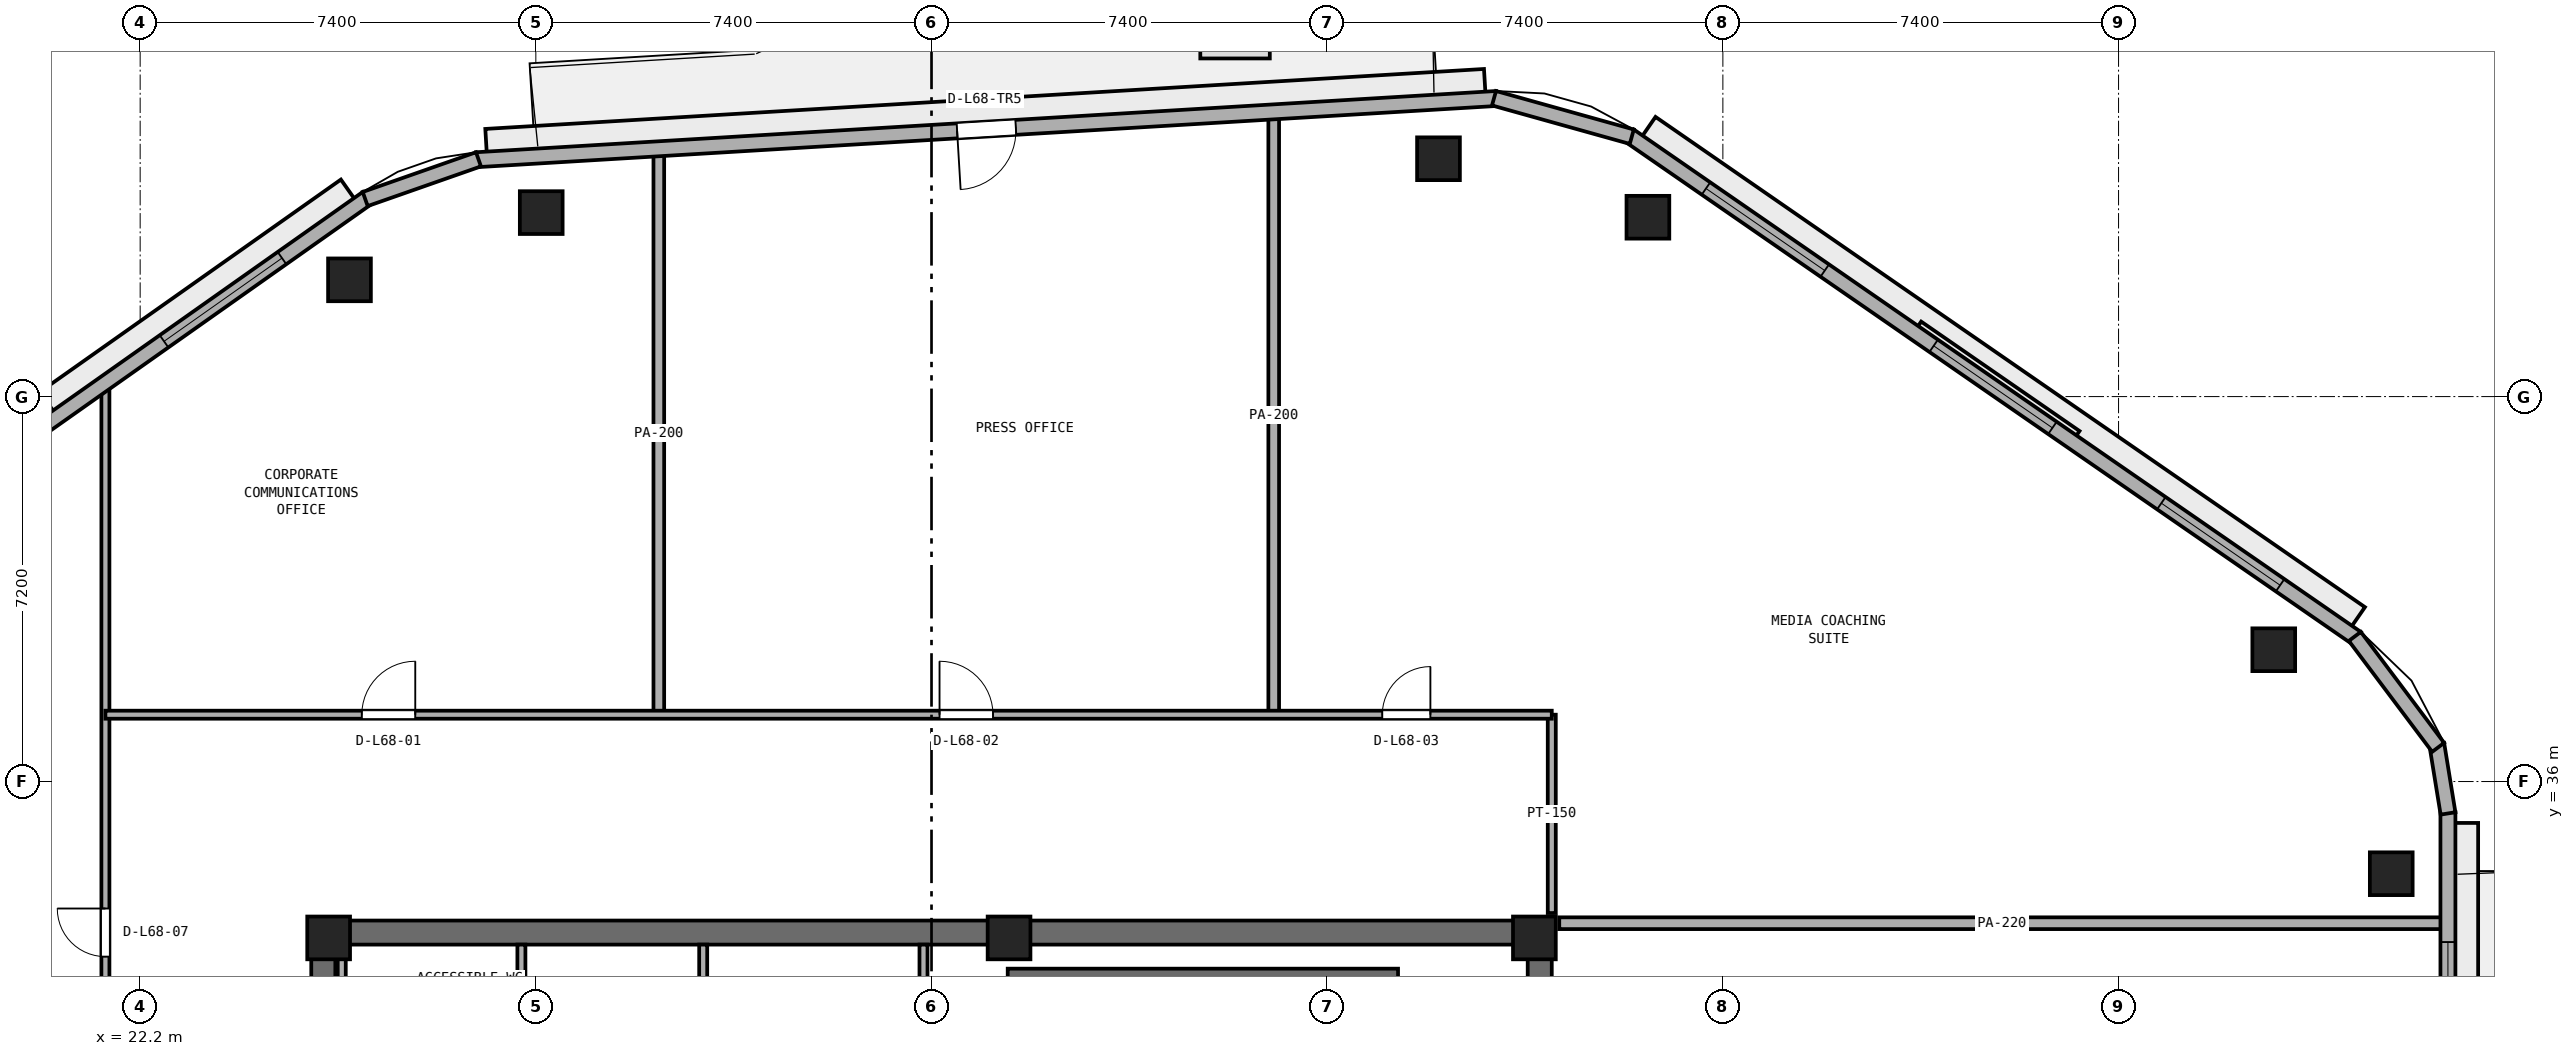
"""IFC4 building model, lengths in metres.
Left out: names, types, materials, properties, quantities, classifications, styles, units other than length and angle.
Written with IfcOpenShell. Run it as: python <this file> out.ifc"""

import sys

from ifc_helpers import new_model, si_unit, direction, frame, frame_2d, origin, origin_2d, place, context, subcontext, project, spatial, rectangle, extrude, element, fill, save


model = new_model("IFC4")
c1 = context("Model", 3, precision=1e-05, world=origin(), true_north=direction((0.0, 1.0)))
c2 = subcontext(c1, "Body", "Model", "MODEL_VIEW")
j1 = project(units=[si_unit("LENGTHUNIT", "METRE"), si_unit("PLANEANGLEUNIT", "RADIAN")], contexts=[c1])
p1 = place(None, origin())
s1 = spatial("IfcSite", under=j1, at=p1, CompositionType="ELEMENT")
p2 = place(p1, origin())
s2 = spatial("IfcBuilding", under=s1, at=p2, CompositionType="ELEMENT")
p3 = place(p2, frame((0.0, 0.0, 266.8)))
s3 = spatial("IfcBuildingStorey", under=s2, at=p3, CompositionType="ELEMENT", Elevation=266.8)
p4 = place(p3, frame((25.4, 33.175, 0.0), z_axis=(0.0, 0.0, 1.0), x_axis=(1.0, 0.0, 0.0)))
e1 = element("IfcWall", 1, at=p4, inside=s3, PredefinedType="SHEAR", context=c2, shape_type="SweptSolid", body=[
    extrude(rectangle(XDim=23.2, YDim=0.45, at=frame_2d((11.6, 0.0))), origin(), (0.0, 0.0, 1.0), 3.51),
])
p5 = place(p3, frame((25.625, 17.45, 0.0), z_axis=(0.0, 0.0, 1.0), x_axis=(0.0, 1.0, 0.0)))
e2 = element("IfcWall", 2, at=p5, inside=s3, PredefinedType="SHEAR", context=c2, shape_type="SweptSolid", body=[
    extrude(rectangle(XDim=15.5, YDim=0.45, at=frame_2d((7.75, 0.0))), origin(), (0.0, 0.0, 1.0), 3.51),
])
p6 = place(p5, frame((7.0, 0.0, 0.0)))
e3 = element("IfcOpeningElement", 3, at=p6, cuts=e2, PredefinedType="OPENING", context=c2, shape_type="SweptSolid", body=[
    extrude(rectangle(XDim=1.5, YDim=2.15, at=frame_2d((0.75, 1.075))), frame((0.0, 0.235, 0.0), z_axis=(0.0, -1.0, 0.0), x_axis=(1.0, 0.0, 0.0)), (0.0, 0.0, 1.0), 0.47),
])
p7 = place(p3, frame((48.375, 17.45, 0.0), z_axis=(0.0, 0.0, 1.0), x_axis=(0.0, 1.0, 0.0)))
e4 = element("IfcWall", 4, at=p7, inside=s3, PredefinedType="SHEAR", context=c2, shape_type="SweptSolid", body=[
    extrude(rectangle(XDim=15.5, YDim=0.45, at=frame_2d((7.75, 0.0))), origin(), (0.0, 0.0, 1.0), 3.51),
])
p8 = place(p7, frame((5.85, 0.0, 0.0)))
e5 = element("IfcOpeningElement", 5, at=p8, cuts=e4, PredefinedType="OPENING", context=c2, shape_type="SweptSolid", body=[
    extrude(rectangle(XDim=1.5, YDim=2.15, at=frame_2d((0.75, 1.075))), frame((0.0, 0.235, 0.0), z_axis=(0.0, -1.0, 0.0), x_axis=(1.0, 0.0, 0.0)), (0.0, 0.0, 1.0), 0.47),
])
for number, where, z_axis, x_axis in (
    (6, (48.275, 33.075, 0.0), (0.0, 0.0, 1.0), (1.0, 0.0, 0.0)),
    (7, (38.45, 33.075, 0.0), (0.0, 0.0, 1.0), (1.0, 0.0, 0.0)),
    (8, (25.725, 33.075, 0.0), (0.0, 0.0, 1.0), (1.0, 0.0, 0.0)),
):
    element("IfcColumn", number, at=place(p3, frame(where, z_axis=z_axis, x_axis=x_axis)), inside=s3, PredefinedType="PILASTER", context=c2, shape_type="SweptSolid", body=[
        extrude(rectangle(XDim=0.8, YDim=0.8, at=origin_2d()), origin(), (0.0, 0.0, 1.0), 3.8),
    ])
for number, where, z_axis, x_axis in (
    (9, (64.3, 34.276, 0.0), (0.0, 0.0, 1.0), (1.0, 0.0, 0.0)),
    (10, (62.103, 38.465, 0.0), (0.0, 0.0, 1.0), (1.0, 0.0, 0.0)),
    (11, (50.398, 46.554, 0.0), (0.0, 0.0, 1.0), (1.0, 0.0, 0.0)),
    (12, (46.481, 47.648, 0.0), (0.0, 0.0, 1.0), (1.0, 0.0, 0.0)),
    (13, (29.701, 46.641, 0.0), (0.0, 0.0, 1.0), (1.0, 0.0, 0.0)),
    (14, (26.115, 45.384, 0.0), (0.0, 0.0, 1.0), (1.0, 0.0, 0.0)),
):
    element("IfcColumn", number, at=place(p3, frame(where, z_axis=z_axis, x_axis=x_axis)), inside=s3, PredefinedType="COLUMN", context=c2, shape_type="SweptSolid", body=[
        extrude(rectangle(XDim=0.8, YDim=0.8, at=origin_2d()), origin(), (0.0, 0.0, 1.0), 3.8),
    ])
p9 = place(p3, frame((38.425, 32.375, 0.0), z_axis=(0.0, 0.0, 1.0), x_axis=(1.0, 0.0, 0.0)))
e15 = element("IfcWall", 15, at=p9, inside=s3, PredefinedType="SHEAR", context=c2, shape_type="SweptSolid", body=[
    extrude(rectangle(XDim=7.3, YDim=0.25, at=frame_2d((3.65, 0.0))), origin(), (0.0, 0.0, 1.0), 3.51),
])
p10 = place(p3, frame((25.97, 30.65, 0.0), z_axis=(0.0, 0.0, 1.0), x_axis=(0.0, 1.0, 0.0)))
e16 = element("IfcWall", 16, at=p10, inside=s3, PredefinedType="PARTITIONING", context=c2, shape_type="SweptSolid", body=[
    extrude(rectangle(XDim=2.3, YDim=0.15, at=frame_2d((1.15, 0.0))), origin(), (0.0, 0.0, 1.0), 2.61),
])
for number, where, z_axis, x_axis in (
    (17, (29.33, 30.65, 0.0), (0.0, 0.0, 1.0), (0.0, 1.0, 0.0)),
    (18, (32.73, 30.65, 0.0), (0.0, 0.0, 1.0), (0.0, 1.0, 0.0)),
    (19, (36.85, 30.65, 0.0), (0.0, 0.0, 1.0), (0.0, 1.0, 0.0)),
):
    element("IfcWall", number, at=place(p3, frame(where, z_axis=z_axis, x_axis=x_axis)), inside=s3, PredefinedType="PARTITIONING", context=c2, shape_type="SweptSolid", body=[
        extrude(rectangle(XDim=2.3, YDim=0.15, at=frame_2d((1.15, 0.0))), origin(), (0.0, 0.0, 1.0), 3.51),
    ])
p11 = place(p3, frame((48.6, 33.54, 0.0), z_axis=(0.0, 0.0, 1.0), x_axis=(0.0, 1.0, 0.0)))
e20 = element("IfcWall", 20, at=p11, inside=s3, PredefinedType="PARTITIONING", context=c2, shape_type="SweptSolid", body=[
    extrude(rectangle(XDim=3.71, YDim=0.15, at=frame_2d((1.855, 0.0))), origin(), (0.0, 0.0, 1.0), 2.893),
])
p12 = place(p3, frame((43.4, 37.25, 0.0), z_axis=(0.0, 0.0, 1.0), x_axis=(0.0, 1.0, 0.0)))
e21 = element("IfcWall", 21, at=p12, inside=s3, PredefinedType="PARTITIONING", context=c2, shape_type="SweptSolid", body=[
    extrude(rectangle(XDim=11.211, YDim=0.2, at=frame_2d((5.605, 0.0))), origin(), (0.0, 0.0, 1.0), 3.51),
])
p13 = place(p3, frame((31.9, 37.25, 0.0), z_axis=(0.0, 0.0, 1.0), x_axis=(0.0, 1.0, 0.0)))
e22 = element("IfcWall", 22, at=p13, inside=s3, PredefinedType="PARTITIONING", context=c2, shape_type="SweptSolid", body=[
    extrude(rectangle(XDim=10.52, YDim=0.2, at=frame_2d((5.26, 0.0))), origin(), (0.0, 0.0, 1.0), 3.51),
])
p14 = place(p3, frame((21.55, 6.608, 0.0), z_axis=(0.0, 0.0, 1.0), x_axis=(0.0, 1.0, 0.0)))
e23 = element("IfcWall", 23, at=p14, inside=s3, PredefinedType="PARTITIONING", context=c2, shape_type="SweptSolid", body=[
    extrude(rectangle(XDim=36.883, YDim=0.15, at=frame_2d((18.441, 0.0))), origin(), (0.0, 0.0, 1.0), 3.51),
])
p15 = place(p14, frame((14.067, 0.0, 0.0)))
e24 = element("IfcOpeningElement", 24, at=p15, cuts=e23, PredefinedType="OPENING", context=c2, shape_type="SweptSolid", body=[
    extrude(rectangle(XDim=0.9, YDim=2.1, at=frame_2d((0.45, 1.05))), frame((0.0, 0.085, 0.0), z_axis=(0.0, -1.0, 0.0), x_axis=(1.0, 0.0, 0.0)), (0.0, 0.0, 1.0), 0.17),
])
p16 = place(p14, frame((26.117, 0.0, 0.0)))
e25 = element("IfcOpeningElement", 25, at=p16, cuts=e23, PredefinedType="OPENING", context=c2, shape_type="SweptSolid", body=[
    extrude(rectangle(XDim=0.9, YDim=2.1, at=frame_2d((0.45, 1.05))), frame((0.0, 0.085, 0.0), z_axis=(0.0, -1.0, 0.0), x_axis=(1.0, 0.0, 0.0)), (0.0, 0.0, 1.0), 0.17),
])
p17 = place(p3, frame((48.74, 33.35, 0.0), z_axis=(0.0, 0.0, 1.0), x_axis=(1.0, 0.0, 0.0)))
e26 = element("IfcWall", 26, at=p17, inside=s3, PredefinedType="PARTITIONING", context=c2, shape_type="SweptSolid", body=[
    extrude(rectangle(XDim=16.555, YDim=0.22, at=frame_2d((8.277, 0.0))), origin(), (0.0, 0.0, 1.0), 2.893),
])
p18 = place(p3, frame((21.55, 37.25, 0.0), z_axis=(0.0, 0.0, 1.0), x_axis=(1.0, 0.0, 0.0)))
e27 = element("IfcWall", 27, at=p18, inside=s3, PredefinedType="PARTITIONING", context=c2, shape_type="SweptSolid", body=[
    extrude(rectangle(XDim=27.05, YDim=0.15, at=frame_2d((13.525, 0.0))), origin(), (0.0, 0.0, 1.0), 3.51),
])
p19 = place(p18, frame((4.795, 0.0, 0.0)))
e28 = element("IfcOpeningElement", 28, at=p19, cuts=e27, PredefinedType="OPENING", context=c2, shape_type="SweptSolid", body=[
    extrude(rectangle(XDim=1.0, YDim=2.12, at=frame_2d((0.5, 1.06))), frame((0.0, 0.085, 0.0), z_axis=(0.0, -1.0, 0.0), x_axis=(1.0, 0.0, 0.0)), (0.0, 0.0, 1.0), 0.17),
])
p20 = place(p18, frame((15.6, 0.0, 0.0)))
e29 = element("IfcOpeningElement", 29, at=p20, cuts=e27, PredefinedType="OPENING", context=c2, shape_type="SweptSolid", body=[
    extrude(rectangle(XDim=1.0, YDim=2.12, at=frame_2d((0.5, 1.06))), frame((0.0, 0.085, 0.0), z_axis=(0.0, -1.0, 0.0), x_axis=(1.0, 0.0, 0.0)), (0.0, 0.0, 1.0), 0.17),
])
p21 = place(p18, frame((23.88, 0.0, 0.0)))
e30 = element("IfcOpeningElement", 30, at=p21, cuts=e27, PredefinedType="OPENING", context=c2, shape_type="SweptSolid", body=[
    extrude(rectangle(XDim=0.9, YDim=2.1, at=frame_2d((0.45, 1.05))), frame((0.0, 0.085, 0.0), z_axis=(0.0, -1.0, 0.0), x_axis=(1.0, 0.0, 0.0)), (0.0, 0.0, 1.0), 0.17),
])
p22 = place(p3, frame((65.36, 16.258, 0.0), z_axis=(0.0, 0.0, 1.0), x_axis=(0.0, 1.0, 0.0)))
e31 = element("IfcWall", 31, at=p22, inside=s3, PredefinedType="STANDARD", context=c2, shape_type="SweptSolid", body=[
    extrude(rectangle(XDim=19.168, YDim=0.28, at=frame_2d((9.584, 0.0))), origin(), (0.0, 0.0, 1.0), 3.51),
])
p23 = place(p22, frame((9.034, 0.0, 0.0)))
e32 = element("IfcOpeningElement", 32, at=p23, cuts=e31, PredefinedType="OPENING", context=c2, shape_type="SweptSolid", body=[
    extrude(rectangle(XDim=1.1, YDim=2.2, at=frame_2d((0.55, 1.1))), frame((0.0, 0.15, 0.0), z_axis=(0.0, -1.0, 0.0), x_axis=(1.0, 0.0, 0.0)), (0.0, 0.0, 1.0), 0.3),
])
p24 = place(p22, frame((2.178, 0.0, 0.9)))
e33 = element("IfcOpeningElement", 33, at=p24, cuts=e31, PredefinedType="OPENING", context=c2, shape_type="SweptSolid", body=[
    extrude(rectangle(XDim=2.7, YDim=1.75, at=frame_2d((1.35, 0.875))), frame((0.0, 0.15, 0.0), z_axis=(0.0, -1.0, 0.0), x_axis=(1.0, 0.0, 0.0)), (0.0, 0.0, 1.0), 0.3),
])
p25 = place(p22, frame((14.04, 0.0, 0.9)))
e34 = element("IfcOpeningElement", 34, at=p25, cuts=e31, PredefinedType="OPENING", context=c2, shape_type="SweptSolid", body=[
    extrude(rectangle(XDim=2.7, YDim=1.75, at=frame_2d((1.35, 0.875))), frame((0.0, 0.15, 0.0), z_axis=(0.0, -1.0, 0.0), x_axis=(1.0, 0.0, 0.0)), (0.0, 0.0, 1.0), 0.3),
])
p26 = place(p3, frame((63.651, 38.683, 0.0), z_axis=(0.0, 0.0, 1.0), x_axis=(-0.822655095, 0.568540759022, 0.0)))
e35 = element("IfcWall", 35, at=p26, inside=s3, PredefinedType="STANDARD", context=c2, shape_type="SweptSolid", body=[
    extrude(rectangle(XDim=16.528, YDim=0.28, at=frame_2d((8.264, 0.0))), origin(), (0.0, 0.0, 1.0), 3.51),
])
p27 = place(p26, frame((1.738, 0.0, 0.9)))
e36 = element("IfcOpeningElement", 36, at=p27, cuts=e35, PredefinedType="OPENING", context=c2, shape_type="SweptSolid", body=[
    extrude(rectangle(XDim=2.7, YDim=1.75, at=frame_2d((1.35, 0.875))), frame((0.0, 0.15, 0.0), z_axis=(0.0, -1.0, 0.0), x_axis=(1.0, 0.0, 0.0)), (0.0, 0.0, 1.0), 0.3),
])
p28 = place(p26, frame((6.914, 0.0, 0.9)))
e37 = element("IfcOpeningElement", 37, at=p28, cuts=e35, PredefinedType="OPENING", context=c2, shape_type="SweptSolid", body=[
    extrude(rectangle(XDim=2.7, YDim=1.75, at=frame_2d((1.35, 0.875))), frame((0.0, 0.15, 0.0), z_axis=(0.0, -1.0, 0.0), x_axis=(1.0, 0.0, 0.0)), (0.0, 0.0, 1.0), 0.3),
])
p29 = place(p26, frame((12.09, 0.0, 0.9)))
e38 = element("IfcOpeningElement", 38, at=p29, cuts=e35, PredefinedType="OPENING", context=c2, shape_type="SweptSolid", body=[
    extrude(rectangle(XDim=2.7, YDim=1.75, at=frame_2d((1.35, 0.875))), frame((0.0, 0.15, 0.0), z_axis=(0.0, -1.0, 0.0), x_axis=(1.0, 0.0, 0.0)), (0.0, 0.0, 1.0), 0.3),
])
p30 = place(p3, frame((47.566, 48.775, 0.0), z_axis=(0.0, 0.0, 1.0), x_axis=(-0.998202767485, -0.059926913695, 0.0)))
e39 = element("IfcWall", 39, at=p30, inside=s3, PredefinedType="STANDARD", context=c2, shape_type="SweptSolid", body=[
    extrude(rectangle(XDim=19.111, YDim=0.28, at=frame_2d((9.556, 0.0))), origin(), (0.0, 0.0, 1.0), 3.51),
])
p31 = place(p30, frame((9.005, 0.0, 0.0)))
e40 = element("IfcOpeningElement", 40, at=p31, cuts=e39, PredefinedType="OPENING", context=c2, shape_type="SweptSolid", body=[
    extrude(rectangle(XDim=1.1, YDim=2.2, at=frame_2d((0.55, 1.1))), frame((0.0, 0.15, 0.0), z_axis=(0.0, -1.0, 0.0), x_axis=(1.0, 0.0, 0.0)), (0.0, 0.0, 1.0), 0.3),
])
p32 = place(p3, frame((26.443, 46.913, 0.0), z_axis=(0.0, 0.0, 1.0), x_axis=(-0.817024179766, -0.576603407619, 0.0)))
e41 = element("IfcWall", 41, at=p32, inside=s3, PredefinedType="STANDARD", context=c2, shape_type="SweptSolid", body=[
    extrude(rectangle(XDim=17.78, YDim=0.28, at=frame_2d((8.89, 0.0))), origin(), (0.0, 0.0, 1.0), 3.51),
])
p33 = place(p32, frame((1.947, 0.0, 0.9)))
e42 = element("IfcOpeningElement", 42, at=p33, cuts=e41, PredefinedType="OPENING", context=c2, shape_type="SweptSolid", body=[
    extrude(rectangle(XDim=2.7, YDim=1.75, at=frame_2d((1.35, 0.875))), frame((0.0, 0.15, 0.0), z_axis=(0.0, -1.0, 0.0), x_axis=(1.0, 0.0, 0.0)), (0.0, 0.0, 1.0), 0.3),
])
p34 = place(p32, frame((7.54, 0.0, 0.9)))
e43 = element("IfcOpeningElement", 43, at=p34, cuts=e41, PredefinedType="OPENING", context=c2, shape_type="SweptSolid", body=[
    extrude(rectangle(XDim=2.7, YDim=1.75, at=frame_2d((1.35, 0.875))), frame((0.0, 0.15, 0.0), z_axis=(0.0, -1.0, 0.0), x_axis=(1.0, 0.0, 0.0)), (0.0, 0.0, 1.0), 0.3),
])
p35 = place(p32, frame((13.133, 0.0, 0.9)))
e44 = element("IfcOpeningElement", 44, at=p35, cuts=e41, PredefinedType="OPENING", context=c2, shape_type="SweptSolid", body=[
    extrude(rectangle(XDim=2.7, YDim=1.75, at=frame_2d((1.35, 0.875))), frame((0.0, 0.15, 0.0), z_axis=(0.0, -1.0, 0.0), x_axis=(1.0, 0.0, 0.0)), (0.0, 0.0, 1.0), 0.3),
])
p36 = place(p3, frame((65.362, 35.403, 0.0), z_axis=(0.0, 0.0, 1.0), x_axis=(-0.160271674114, 0.987072940809, 0.0)))
e45 = element("IfcWall", 45, at=p36, inside=s3, PredefinedType="STANDARD", context=c2, shape_type="SweptSolid", body=[
    extrude(rectangle(XDim=1.315, YDim=0.28, at=frame_2d((0.657, 0.0))), origin(), (0.0, 0.0, 1.0), 3.51),
])
p37 = place(p3, frame((65.177, 36.639, 0.0), z_axis=(0.0, 0.0, 1.0), x_axis=(-0.600436386467, 0.799672524104, 0.0)))
e46 = element("IfcWall", 46, at=p37, inside=s3, PredefinedType="STANDARD", context=c2, shape_type="SweptSolid", body=[
    extrude(rectangle(XDim=2.595, YDim=0.28, at=frame_2d((1.298, 0.0))), origin(), (0.0, 0.0, 1.0), 3.51),
])
p38 = place(p3, frame((50.096, 48.061, 0.0), z_axis=(0.0, 0.0, 1.0), x_axis=(-0.963108887091, 0.269112005688, 0.0)))
e47 = element("IfcWall", 47, at=p38, inside=s3, PredefinedType="STANDARD", context=c2, shape_type="SweptSolid", body=[
    extrude(rectangle(XDim=2.675, YDim=0.28, at=frame_2d((1.338, 0.0))), origin(), (0.0, 0.0, 1.0), 3.51),
])
p39 = place(p3, frame((28.527, 47.638, 0.0), z_axis=(0.0, 0.0, 1.0), x_axis=(-0.943686979207, -0.330839667022, 0.0)))
e48 = element("IfcWall", 48, at=p39, inside=s3, PredefinedType="STANDARD", context=c2, shape_type="SweptSolid", body=[
    extrude(rectangle(XDim=2.245, YDim=0.28, at=frame_2d((1.123, 0.0))), origin(), (0.0, 0.0, 1.0), 3.51),
])
p40 = place(p19, origin())
e49 = element("IfcDoor", 49, at=p40, inside=s3, OperationType="SINGLE_SWING_RIGHT", PredefinedType="DOOR", context=c2, shape_type="SweptSolid", body=[
    extrude(rectangle(XDim=1.0, YDim=2.12, at=frame_2d((0.5, 1.06))), frame((0.0, 0.025, 0.0), z_axis=(0.0, -1.0, 0.0), x_axis=(1.0, 0.0, 0.0)), (0.0, 0.0, 1.0), 0.05),
])
fill(e28, e49)
p41 = place(p20, origin())
e50 = element("IfcDoor", 50, at=p41, inside=s3, OperationType="SINGLE_SWING_LEFT", PredefinedType="DOOR", context=c2, shape_type="SweptSolid", body=[
    extrude(rectangle(XDim=1.0, YDim=2.12, at=frame_2d((0.5, 1.06))), frame((0.0, 0.025, 0.0), z_axis=(0.0, -1.0, 0.0), x_axis=(1.0, 0.0, 0.0)), (0.0, 0.0, 1.0), 0.05),
])
fill(e29, e50)
p42 = place(p21, origin())
e51 = element("IfcDoor", 51, at=p42, inside=s3, OperationType="SINGLE_SWING_RIGHT", PredefinedType="DOOR", context=c2, shape_type="SweptSolid", body=[
    extrude(rectangle(XDim=0.9, YDim=2.1, at=frame_2d((0.45, 1.05))), frame((0.0, 0.025, 0.0), z_axis=(0.0, -1.0, 0.0), x_axis=(1.0, 0.0, 0.0)), (0.0, 0.0, 1.0), 0.05),
])
fill(e30, e51)
p43 = place(p16, origin())
e52 = element("IfcDoor", 52, at=p43, inside=s3, OperationType="SINGLE_SWING_RIGHT", PredefinedType="DOOR", context=c2, shape_type="SweptSolid", body=[
    extrude(rectangle(XDim=0.9, YDim=2.1, at=frame_2d((0.45, 1.05))), frame((0.0, 0.025, 0.0), z_axis=(0.0, -1.0, 0.0), x_axis=(1.0, 0.0, 0.0)), (0.0, 0.0, 1.0), 0.05),
])
fill(e25, e52)
p44 = place(p25, origin())
e53 = element("IfcWindow", 53, at=p44, inside=s3, PartitioningType="SINGLE_PANEL", PredefinedType="WINDOW", context=c2, shape_type="SweptSolid", body=[
    extrude(rectangle(XDim=2.7, YDim=1.75, at=frame_2d((1.35, 0.875))), frame((0.0, 0.03, 0.0), z_axis=(0.0, -1.0, 0.0), x_axis=(1.0, 0.0, 0.0)), (0.0, 0.0, 1.0), 0.06),
])
fill(e34, e53)
p45 = place(p27, origin())
e54 = element("IfcWindow", 54, at=p45, inside=s3, PartitioningType="SINGLE_PANEL", PredefinedType="WINDOW", context=c2, shape_type="SweptSolid", body=[
    extrude(rectangle(XDim=2.7, YDim=1.75, at=frame_2d((1.35, 0.875))), frame((0.0, 0.03, 0.0), z_axis=(0.0, -1.0, 0.0), x_axis=(1.0, 0.0, 0.0)), (0.0, 0.0, 1.0), 0.06),
])
fill(e36, e54)
p46 = place(p28, origin())
e55 = element("IfcWindow", 55, at=p46, inside=s3, PartitioningType="SINGLE_PANEL", PredefinedType="WINDOW", context=c2, shape_type="SweptSolid", body=[
    extrude(rectangle(XDim=2.7, YDim=1.75, at=frame_2d((1.35, 0.875))), frame((0.0, 0.03, 0.0), z_axis=(0.0, -1.0, 0.0), x_axis=(1.0, 0.0, 0.0)), (0.0, 0.0, 1.0), 0.06),
])
fill(e37, e55)
p47 = place(p29, origin())
e56 = element("IfcWindow", 56, at=p47, inside=s3, PartitioningType="SINGLE_PANEL", PredefinedType="WINDOW", context=c2, shape_type="SweptSolid", body=[
    extrude(rectangle(XDim=2.7, YDim=1.75, at=frame_2d((1.35, 0.875))), frame((0.0, 0.03, 0.0), z_axis=(0.0, -1.0, 0.0), x_axis=(1.0, 0.0, 0.0)), (0.0, 0.0, 1.0), 0.06),
])
fill(e38, e56)
p48 = place(p31, origin())
e57 = element("IfcDoor", 57, at=p48, inside=s3, OperationType="SINGLE_SWING_RIGHT", PredefinedType="DOOR", context=c2, shape_type="SweptSolid", body=[
    extrude(rectangle(XDim=1.1, YDim=2.2, at=frame_2d((0.55, 1.1))), frame((0.0, 0.025, 0.0), z_axis=(0.0, -1.0, 0.0), x_axis=(1.0, 0.0, 0.0)), (0.0, 0.0, 1.0), 0.05),
])
fill(e40, e57)
p49 = place(p33, origin())
e58 = element("IfcWindow", 58, at=p49, inside=s3, PartitioningType="SINGLE_PANEL", PredefinedType="WINDOW", context=c2, shape_type="SweptSolid", body=[
    extrude(rectangle(XDim=2.7, YDim=1.75, at=frame_2d((1.35, 0.875))), frame((0.0, 0.03, 0.0), z_axis=(0.0, -1.0, 0.0), x_axis=(1.0, 0.0, 0.0)), (0.0, 0.0, 1.0), 0.06),
])
fill(e42, e58)
save(model, sys.argv[1])
